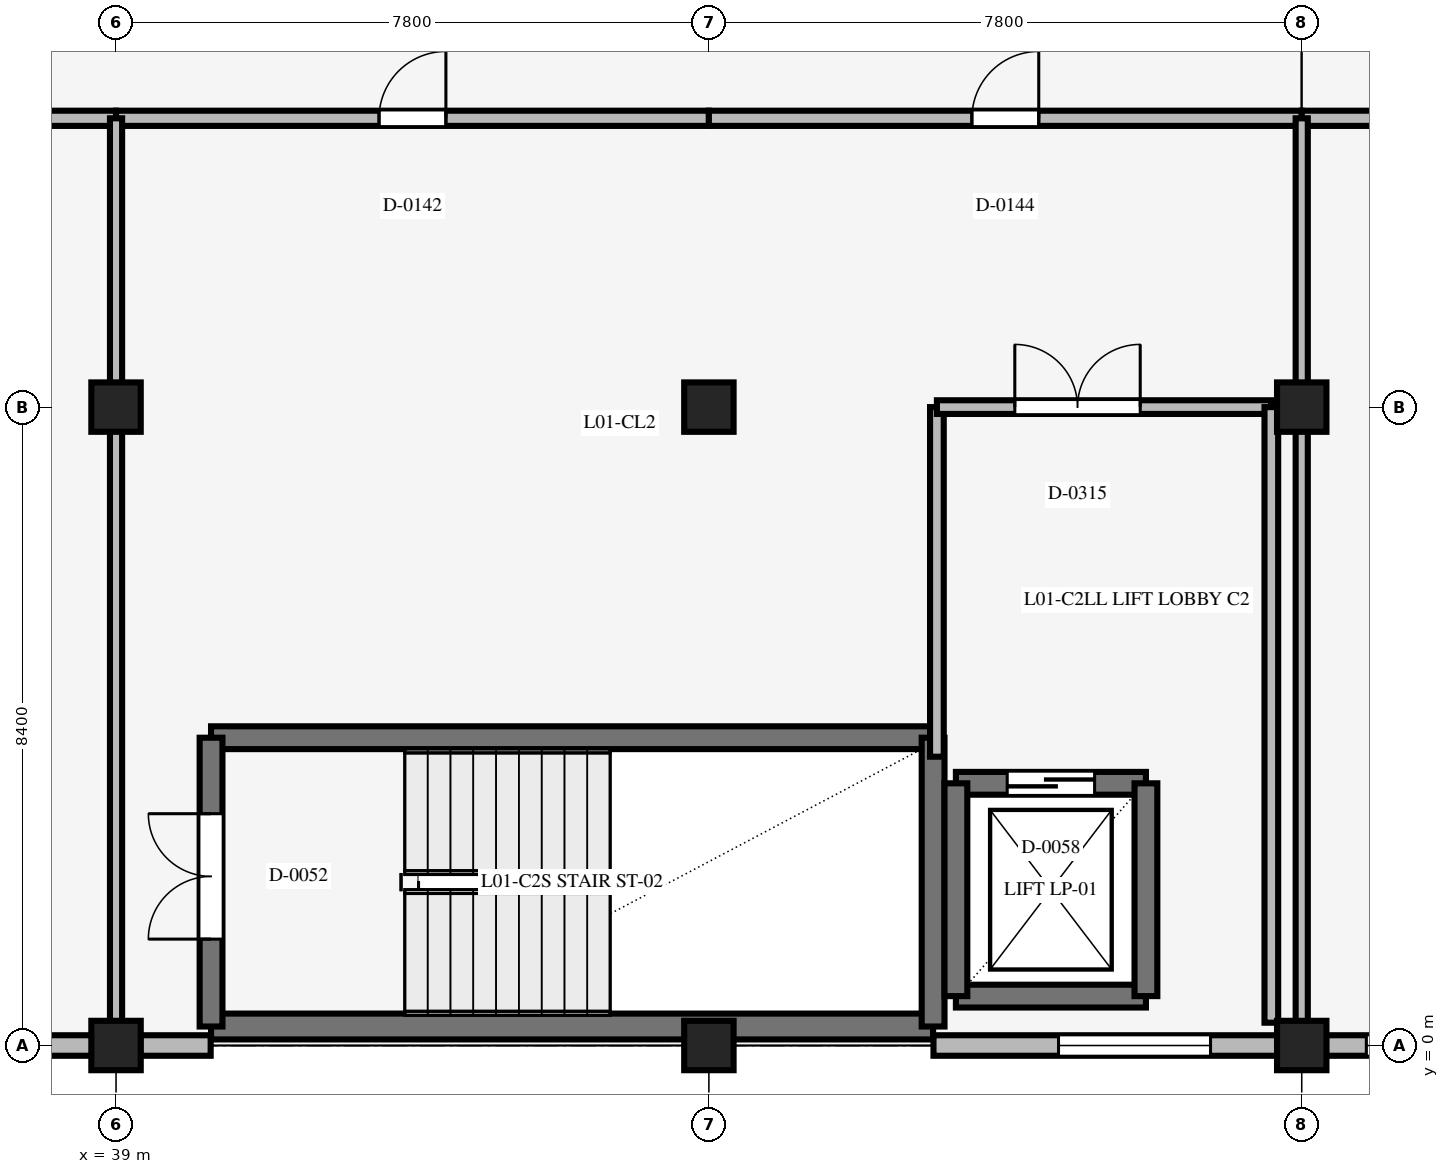
"""IFC4 building model, lengths in metres.
Left out: names, types, materials, properties, quantities, classifications, styles, units other than length and angle.
Written with IfcOpenShell. Run it as: python <this file> out.ifc"""

import sys

from ifc_helpers import new_model, si_unit, direction, frame, frame_2d, origin, origin_2d, place, context, subcontext, project, spatial, rectangle, extrude, element, fill, save


model = new_model("IFC4")
c1 = context("Model", 3, precision=1e-05, world=origin(), true_north=direction((0.0, 1.0)))
c2 = subcontext(c1, "Body", "Model", "MODEL_VIEW")
j1 = project(units=[si_unit("LENGTHUNIT", "METRE"), si_unit("PLANEANGLEUNIT", "RADIAN")], contexts=[c1])
p1 = place(None, origin())
s1 = spatial("IfcSite", under=j1, at=p1, CompositionType="ELEMENT")
p2 = place(p1, origin())
s2 = spatial("IfcBuilding", under=s1, at=p2, CompositionType="ELEMENT")
p3 = place(p2, frame((0.0, 0.0, 6.0)))
s3 = spatial("IfcBuildingStorey", under=s2, at=p3, CompositionType="ELEMENT", Elevation=6.0)
for number, where, z_axis, x_axis in (
    (1, (39.0, 0.0, 0.0), (0.0, 0.0, 1.0), (1.0, 0.0, 0.0)),
    (2, (39.0, 8.4, 0.0), (0.0, 0.0, 1.0), (1.0, 0.0, 0.0)),
    (3, (46.8, 0.0, 0.0), (0.0, 0.0, 1.0), (1.0, 0.0, 0.0)),
    (4, (46.8, 8.4, 0.0), (0.0, 0.0, 1.0), (1.0, 0.0, 0.0)),
    (5, (54.6, 0.0, 0.0), (0.0, 0.0, 1.0), (1.0, 0.0, 0.0)),
    (6, (54.6, 8.4, 0.0), (0.0, 0.0, 1.0), (1.0, 0.0, 0.0)),
):
    element("IfcColumn", number, at=place(p3, frame(where, z_axis=z_axis, x_axis=x_axis)), inside=s3, PredefinedType="COLUMN", context=c2, shape_type="SweptSolid", body=[
        extrude(rectangle(XDim=0.65, YDim=0.65, at=origin_2d()), origin(), (0.0, 0.0, 1.0), 6.0),
    ])
p4 = place(p3, frame((49.75, 0.25, 0.0), z_axis=(0.0, 0.0, 1.0), x_axis=(-1.0, 0.0, 0.0)))
e7 = element("IfcWall", 7, at=p4, inside=s3, PredefinedType="STANDARD", context=c2, shape_type="SweptSolid", body=[
    extrude(rectangle(XDim=9.5, YDim=0.34, at=frame_2d((4.75, 0.0))), origin(), (0.0, 0.0, 1.0), 6.0),
])
p5 = place(p3, frame((40.25, 4.05, 0.0), z_axis=(0.0, 0.0, 1.0), x_axis=(1.0, 0.0, 0.0)))
e8 = element("IfcWall", 8, at=p5, inside=s3, PredefinedType="SHEAR", context=c2, shape_type="SweptSolid", body=[
    extrude(rectangle(XDim=9.5, YDim=0.3, at=frame_2d((4.75, 0.0))), origin(), (0.0, 0.0, 1.0), 6.0),
])
p6 = place(p3, frame((40.25, 0.25, 0.0), z_axis=(0.0, 0.0, 1.0), x_axis=(0.0, 1.0, 0.0)))
e9 = element("IfcWall", 9, at=p6, inside=s3, PredefinedType="SHEAR", context=c2, shape_type="SweptSolid", body=[
    extrude(rectangle(XDim=3.8, YDim=0.3, at=frame_2d((1.9, 0.0))), origin(), (0.0, 0.0, 1.0), 6.0),
])
p7 = place(p6, frame((1.15, 0.0, 0.0)))
e10 = element("IfcOpeningElement", 10, at=p7, cuts=e9, PredefinedType="OPENING", context=c2, shape_type="SweptSolid", body=[
    extrude(rectangle(XDim=1.65, YDim=2.2, at=frame_2d((0.825, 1.1))), frame((0.0, 0.16, 0.0), z_axis=(0.0, -1.0, 0.0), x_axis=(1.0, 0.0, 0.0)), (0.0, 0.0, 1.0), 0.32),
])
p8 = place(p3, frame((49.75, 0.25, 0.0), z_axis=(0.0, 0.0, 1.0), x_axis=(0.0, 1.0, 0.0)))
e11 = element("IfcWall", 11, at=p8, inside=s3, PredefinedType="SHEAR", context=c2, shape_type="SweptSolid", body=[
    extrude(rectangle(XDim=3.8, YDim=0.3, at=frame_2d((1.9, 0.0))), origin(), (0.0, 0.0, 1.0), 6.0),
])
p9 = place(p3, frame((50.05, 0.65, 0.0), z_axis=(0.0, 0.0, 1.0), x_axis=(1.0, 0.0, 0.0)))
e12 = element("IfcWall", 12, at=p9, inside=s3, PredefinedType="SHEAR", context=c2, shape_type="SweptSolid", body=[
    extrude(rectangle(XDim=2.5, YDim=0.3, at=frame_2d((1.25, 0.0))), origin(), (0.0, 0.0, 1.0), 5.64),
])
p10 = place(p3, frame((50.05, 3.45, 0.0), z_axis=(0.0, 0.0, 1.0), x_axis=(1.0, 0.0, 0.0)))
e13 = element("IfcWall", 13, at=p10, inside=s3, PredefinedType="SHEAR", context=c2, shape_type="SweptSolid", body=[
    extrude(rectangle(XDim=2.5, YDim=0.3, at=frame_2d((1.25, 0.0))), origin(), (0.0, 0.0, 1.0), 5.64),
])
p11 = place(p10, frame((0.675, 0.0, 0.0)))
e14 = element("IfcOpeningElement", 14, at=p11, cuts=e13, PredefinedType="OPENING", context=c2, shape_type="SweptSolid", body=[
    extrude(rectangle(XDim=1.15, YDim=2.2, at=frame_2d((0.575, 1.1))), frame((0.0, 0.16, 0.0), z_axis=(0.0, -1.0, 0.0), x_axis=(1.0, 0.0, 0.0)), (0.0, 0.0, 1.0), 0.32),
])
for number, where, z_axis, x_axis in (
    (15, (50.05, 0.65, 0.0), (0.0, 0.0, 1.0), (0.0, 1.0, 0.0)),
    (16, (52.55, 0.65, 0.0), (0.0, 0.0, 1.0), (0.0, 1.0, 0.0)),
):
    element("IfcWall", number, at=place(p3, frame(where, z_axis=z_axis, x_axis=x_axis)), inside=s3, PredefinedType="SHEAR", context=c2, shape_type="SweptSolid", body=[
        extrude(rectangle(XDim=2.8, YDim=0.3, at=frame_2d((1.4, 0.0))), origin(), (0.0, 0.0, 1.0), 5.64),
    ])
p12 = place(p3, frame((38.685, 0.0, 0.0), z_axis=(0.0, 0.0, 1.0), x_axis=(-1.0, 0.0, 0.0)))
e17 = element("IfcWall", 17, at=p12, inside=s3, PredefinedType="STANDARD", context=c2, shape_type="SweptSolid", body=[
    extrude(rectangle(XDim=7.17, YDim=0.27, at=frame_2d((3.585, 0.0))), origin(), (0.0, 0.0, 1.0), 5.371),
])
p13 = place(p12, frame((0.935, 0.0, 0.9)))
e18 = element("IfcOpeningElement", 18, at=p13, cuts=e17, PredefinedType="OPENING", context=c2, shape_type="SweptSolid", body=[
    extrude(rectangle(XDim=3.2, YDim=2.1, at=frame_2d((1.6, 1.05))), frame((0.0, 0.145, 0.0), z_axis=(0.0, -1.0, 0.0), x_axis=(1.0, 0.0, 0.0)), (0.0, 0.0, 1.0), 0.29),
])
p14 = place(p3, frame((40.245, 0.0, 0.0), z_axis=(0.0, 0.0, 1.0), x_axis=(-1.0, 0.0, 0.0)))
e19 = element("IfcWall", 19, at=p14, inside=s3, PredefinedType="STANDARD", context=c2, shape_type="SweptSolid", body=[
    extrude(rectangle(XDim=0.925, YDim=0.27, at=frame_2d((0.462, 0.0))), origin(), (0.0, 0.0, 1.0), 5.72),
])
p15 = place(p3, frame((54.285, 0.0, 0.0), z_axis=(0.0, 0.0, 1.0), x_axis=(-1.0, 0.0, 0.0)))
e20 = element("IfcWall", 20, at=p15, inside=s3, PredefinedType="STANDARD", context=c2, shape_type="SweptSolid", body=[
    extrude(rectangle(XDim=4.53, YDim=0.27, at=frame_2d((2.265, 0.0))), origin(), (0.0, 0.0, 1.0), 5.72),
])
p16 = place(p15, frame((0.885, 0.0, 1.2)))
e21 = element("IfcOpeningElement", 21, at=p16, cuts=e20, PredefinedType="OPENING", context=c2, shape_type="SweptSolid", body=[
    extrude(rectangle(XDim=2.0, YDim=0.9, at=frame_2d((1.0, 0.45))), frame((0.0, 0.145, 0.0), z_axis=(0.0, -1.0, 0.0), x_axis=(1.0, 0.0, 0.0)), (0.0, 0.0, 1.0), 0.29),
])
p17 = place(p3, frame((57.445, 0.0, 0.0), z_axis=(0.0, 0.0, 1.0), x_axis=(-1.0, 0.0, 0.0)))
e22 = element("IfcWall", 22, at=p17, inside=s3, PredefinedType="STANDARD", context=c2, shape_type="SweptSolid", body=[
    extrude(rectangle(XDim=2.525, YDim=0.27, at=frame_2d((1.263, 0.0))), origin(), (0.0, 0.0, 1.0), 5.72),
])
p18 = place(p17, frame((0.495, 0.0, 0.95)))
e23 = element("IfcOpeningElement", 23, at=p18, cuts=e22, PredefinedType="OPENING", context=c2, shape_type="SweptSolid", body=[
    extrude(rectangle(XDim=1.5, YDim=1.6, at=frame_2d((0.75, 0.8))), frame((0.0, 0.145, 0.0), z_axis=(0.0, -1.0, 0.0), x_axis=(1.0, 0.0, 0.0)), (0.0, 0.0, 1.0), 0.29),
])
p19 = place(p3, frame((31.2, 12.2, 0.0), z_axis=(0.0, 0.0, 1.0), x_axis=(1.0, 0.0, 0.0)))
e24 = element("IfcWall", 24, at=p19, inside=s3, PredefinedType="STANDARD", context=c2, shape_type="SweptSolid", body=[
    extrude(rectangle(XDim=7.8, YDim=0.2, at=frame_2d((3.9, 0.0))), origin(), (0.0, 0.0, 1.0), 3.15),
])
p20 = place(p19, frame((3.46, 0.0, 0.0)))
e25 = element("IfcOpeningElement", 25, at=p20, cuts=e24, PredefinedType="OPENING", context=c2, shape_type="SweptSolid", body=[
    extrude(rectangle(XDim=0.88, YDim=2.1, at=frame_2d((0.44, 1.05))), frame((0.0, 0.11, 0.0), z_axis=(0.0, -1.0, 0.0), x_axis=(1.0, 0.0, 0.0)), (0.0, 0.0, 1.0), 0.22),
])
p21 = place(p3, frame((39.0, 12.2, 0.0), z_axis=(0.0, 0.0, 1.0), x_axis=(1.0, 0.0, 0.0)))
e26 = element("IfcWall", 26, at=p21, inside=s3, PredefinedType="STANDARD", context=c2, shape_type="SweptSolid", body=[
    extrude(rectangle(XDim=7.8, YDim=0.2, at=frame_2d((3.9, 0.0))), origin(), (0.0, 0.0, 1.0), 3.15),
])
p22 = place(p21, frame((3.46, 0.0, 0.0)))
e27 = element("IfcOpeningElement", 27, at=p22, cuts=e26, PredefinedType="OPENING", context=c2, shape_type="SweptSolid", body=[
    extrude(rectangle(XDim=0.88, YDim=2.1, at=frame_2d((0.44, 1.05))), frame((0.0, 0.11, 0.0), z_axis=(0.0, -1.0, 0.0), x_axis=(1.0, 0.0, 0.0)), (0.0, 0.0, 1.0), 0.22),
])
p23 = place(p3, frame((46.8, 12.2, 0.0), z_axis=(0.0, 0.0, 1.0), x_axis=(1.0, 0.0, 0.0)))
e28 = element("IfcWall", 28, at=p23, inside=s3, PredefinedType="STANDARD", context=c2, shape_type="SweptSolid", body=[
    extrude(rectangle(XDim=7.8, YDim=0.2, at=frame_2d((3.9, 0.0))), origin(), (0.0, 0.0, 1.0), 3.15),
])
p24 = place(p23, frame((3.46, 0.0, 0.0)))
e29 = element("IfcOpeningElement", 29, at=p24, cuts=e28, PredefinedType="OPENING", context=c2, shape_type="SweptSolid", body=[
    extrude(rectangle(XDim=0.88, YDim=2.1, at=frame_2d((0.44, 1.05))), frame((0.0, 0.11, 0.0), z_axis=(0.0, -1.0, 0.0), x_axis=(1.0, 0.0, 0.0)), (0.0, 0.0, 1.0), 0.22),
])
p25 = place(p3, frame((54.6, 12.2, 0.0), z_axis=(0.0, 0.0, 1.0), x_axis=(1.0, 0.0, 0.0)))
e30 = element("IfcWall", 30, at=p25, inside=s3, PredefinedType="STANDARD", context=c2, shape_type="SweptSolid", body=[
    extrude(rectangle(XDim=8.4, YDim=0.2, at=frame_2d((4.2, 0.0))), origin(), (0.0, 0.0, 1.0), 3.15),
])
p26 = place(p25, frame((3.76, 0.0, 0.0)))
e31 = element("IfcOpeningElement", 31, at=p26, cuts=e30, PredefinedType="OPENING", context=c2, shape_type="SweptSolid", body=[
    extrude(rectangle(XDim=0.88, YDim=2.1, at=frame_2d((0.44, 1.05))), frame((0.0, 0.11, 0.0), z_axis=(0.0, -1.0, 0.0), x_axis=(1.0, 0.0, 0.0)), (0.0, 0.0, 1.0), 0.22),
])
p27 = place(p3, frame((39.0, 0.3, 0.0), z_axis=(0.0, 0.0, 1.0), x_axis=(0.0, 1.0, 0.0)))
e32 = element("IfcWall", 32, at=p27, inside=s3, PredefinedType="STANDARD", context=c2, shape_type="SweptSolid", body=[
    extrude(rectangle(XDim=7.8, YDim=0.16, at=frame_2d((3.9, 0.0))), origin(), (0.0, 0.0, 1.0), 3.15),
])
p28 = place(p3, frame((39.0, 8.7, 0.0), z_axis=(0.0, 0.0, 1.0), x_axis=(0.0, 1.0, 0.0)))
e33 = element("IfcWall", 33, at=p28, inside=s3, PredefinedType="STANDARD", context=c2, shape_type="SweptSolid", body=[
    extrude(rectangle(XDim=3.5, YDim=0.16, at=frame_2d((1.75, 0.0))), origin(), (0.0, 0.0, 1.0), 3.15),
])
p29 = place(p3, frame((54.6, 0.3, 0.0), z_axis=(0.0, 0.0, 1.0), x_axis=(0.0, 1.0, 0.0)))
e34 = element("IfcWall", 34, at=p29, inside=s3, PredefinedType="STANDARD", context=c2, shape_type="SweptSolid", body=[
    extrude(rectangle(XDim=7.8, YDim=0.16, at=frame_2d((3.9, 0.0))), origin(), (0.0, 0.0, 1.0), 3.15),
])
p30 = place(p3, frame((54.6, 8.7, 0.0), z_axis=(0.0, 0.0, 1.0), x_axis=(0.0, 1.0, 0.0)))
e35 = element("IfcWall", 35, at=p30, inside=s3, PredefinedType="STANDARD", context=c2, shape_type="SweptSolid", body=[
    extrude(rectangle(XDim=3.5, YDim=0.16, at=frame_2d((1.75, 0.0))), origin(), (0.0, 0.0, 1.0), 3.15),
])
p31 = place(p3, frame((49.8, 3.8, 0.0), z_axis=(0.0, 0.0, 1.0), x_axis=(0.0, 1.0, 0.0)))
e36 = element("IfcWall", 36, at=p31, inside=s3, PredefinedType="STANDARD", context=c2, shape_type="SweptSolid", body=[
    extrude(rectangle(XDim=4.6, YDim=0.18, at=frame_2d((2.3, 0.0))), origin(), (0.0, 0.0, 1.0), 3.15),
])
p32 = place(p3, frame((49.8, 8.4, 0.0), z_axis=(0.0, 0.0, 1.0), x_axis=(1.0, 0.0, 0.0)))
e37 = element("IfcWall", 37, at=p32, inside=s3, PredefinedType="STANDARD", context=c2, shape_type="SweptSolid", body=[
    extrude(rectangle(XDim=4.4, YDim=0.18, at=frame_2d((2.2, 0.0))), origin(), (0.0, 0.0, 1.0), 3.15),
])
p33 = place(p32, frame((1.025, 0.0, 0.0)))
e38 = element("IfcOpeningElement", 38, at=p33, cuts=e37, PredefinedType="OPENING", context=c2, shape_type="SweptSolid", body=[
    extrude(rectangle(XDim=1.65, YDim=2.2, at=frame_2d((0.825, 1.1))), frame((0.0, 0.1, 0.0), z_axis=(0.0, -1.0, 0.0), x_axis=(1.0, 0.0, 0.0)), (0.0, 0.0, 1.0), 0.2),
])
p34 = place(p3, frame((54.2, 0.3, 0.0), z_axis=(0.0, 0.0, 1.0), x_axis=(0.0, 1.0, 0.0)))
e39 = element("IfcWall", 39, at=p34, inside=s3, PredefinedType="STANDARD", context=c2, shape_type="SweptSolid", body=[
    extrude(rectangle(XDim=8.1, YDim=0.18, at=frame_2d((4.05, 0.0))), origin(), (0.0, 0.0, 1.0), 3.15),
])
p35 = place(p16, origin())
e40 = element("IfcWindow", 40, at=p35, inside=s3, PartitioningType="SINGLE_PANEL", PredefinedType="WINDOW", context=c2, shape_type="SweptSolid", body=[
    extrude(rectangle(XDim=2.0, YDim=0.9, at=frame_2d((1.0, 0.45))), frame((0.0, 0.03, 0.0), z_axis=(0.0, -1.0, 0.0), x_axis=(1.0, 0.0, 0.0)), (0.0, 0.0, 1.0), 0.06),
])
fill(e21, e40)
p36 = place(p18, origin())
e41 = element("IfcWindow", 41, at=p36, inside=s3, PartitioningType="SINGLE_PANEL", PredefinedType="WINDOW", context=c2, shape_type="SweptSolid", body=[
    extrude(rectangle(XDim=1.5, YDim=1.6, at=frame_2d((0.75, 0.8))), frame((0.0, 0.03, 0.0), z_axis=(0.0, -1.0, 0.0), x_axis=(1.0, 0.0, 0.0)), (0.0, 0.0, 1.0), 0.06),
])
fill(e23, e41)
p37 = place(p7, origin())
e42 = element("IfcDoor", 42, at=p37, inside=s3, OperationType="DOUBLE_DOOR_SINGLE_SWING", PredefinedType="DOOR", context=c2, shape_type="SweptSolid", body=[
    extrude(rectangle(XDim=1.65, YDim=2.2, at=frame_2d((0.825, 1.1))), frame((0.0, 0.025, 0.0), z_axis=(0.0, -1.0, 0.0), x_axis=(1.0, 0.0, 0.0)), (0.0, 0.0, 1.0), 0.05),
])
fill(e10, e42)
p38 = place(p11, origin())
e43 = element("IfcDoor", 43, at=p38, inside=s3, OperationType="DOUBLE_DOOR_SLIDING", PredefinedType="DOOR", context=c2, shape_type="SweptSolid", body=[
    extrude(rectangle(XDim=1.15, YDim=2.2, at=frame_2d((0.575, 1.1))), frame((0.0, 0.025, 0.0), z_axis=(0.0, -1.0, 0.0), x_axis=(1.0, 0.0, 0.0)), (0.0, 0.0, 1.0), 0.05),
])
fill(e14, e43)
p39 = place(p22, origin())
e44 = element("IfcDoor", 44, at=p39, inside=s3, OperationType="SINGLE_SWING_RIGHT", PredefinedType="DOOR", context=c2, shape_type="SweptSolid", body=[
    extrude(rectangle(XDim=0.88, YDim=2.1, at=frame_2d((0.44, 1.05))), frame((0.0, 0.025, 0.0), z_axis=(0.0, -1.0, 0.0), x_axis=(1.0, 0.0, 0.0)), (0.0, 0.0, 1.0), 0.05),
])
fill(e27, e44)
p40 = place(p24, origin())
e45 = element("IfcDoor", 45, at=p40, inside=s3, OperationType="SINGLE_SWING_RIGHT", PredefinedType="DOOR", context=c2, shape_type="SweptSolid", body=[
    extrude(rectangle(XDim=0.88, YDim=2.1, at=frame_2d((0.44, 1.05))), frame((0.0, 0.025, 0.0), z_axis=(0.0, -1.0, 0.0), x_axis=(1.0, 0.0, 0.0)), (0.0, 0.0, 1.0), 0.05),
])
fill(e29, e45)
p41 = place(p33, origin())
e46 = element("IfcDoor", 46, at=p41, inside=s3, OperationType="DOUBLE_DOOR_SINGLE_SWING", PredefinedType="DOOR", context=c2, shape_type="SweptSolid", body=[
    extrude(rectangle(XDim=1.65, YDim=2.2, at=frame_2d((0.825, 1.1))), frame((0.0, 0.025, 0.0), z_axis=(0.0, -1.0, 0.0), x_axis=(1.0, 0.0, 0.0)), (0.0, 0.0, 1.0), 0.05),
])
fill(e38, e46)
save(model, sys.argv[1])
